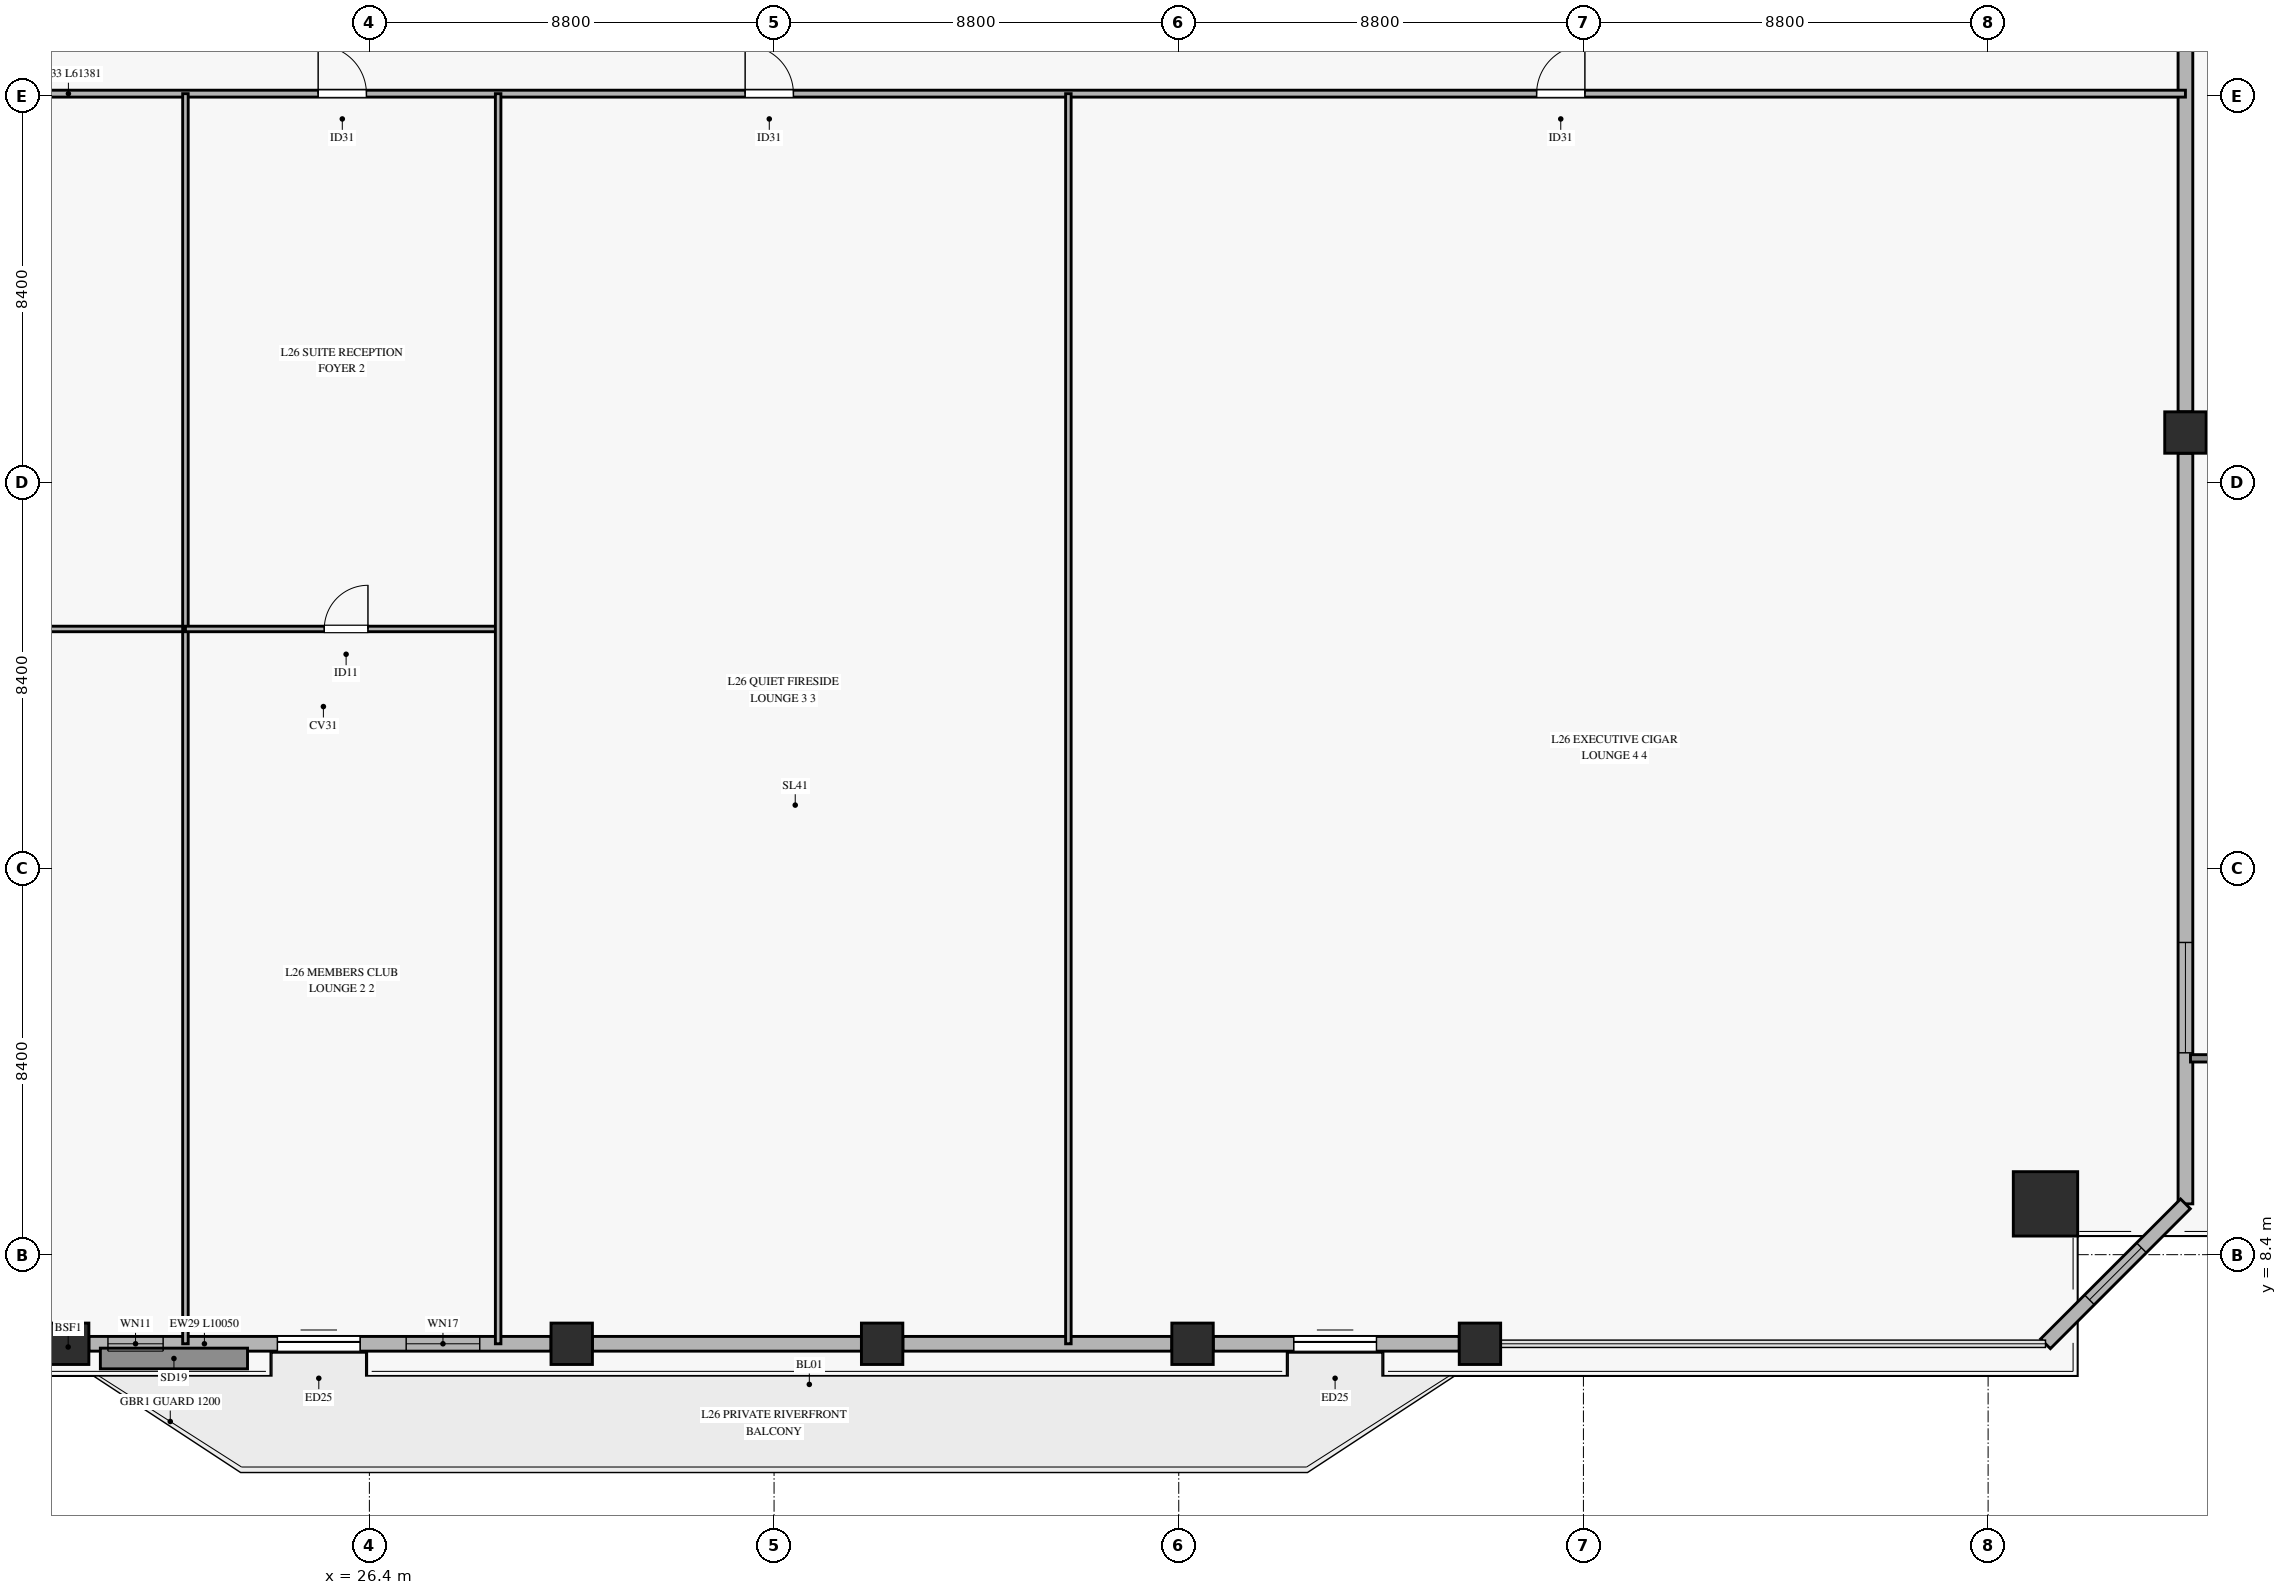
"""IFC4 building model, lengths in metres.
Left out: names, types, materials, properties, quantities, classifications, styles, units other than length and angle.
Written with IfcOpenShell. Run it as: python <this file> out.ifc"""

import sys

from ifc_helpers import new_model, si_unit, direction, frame, frame_2d, origin, origin_2d, place, context, subcontext, project, spatial, rectangle, hollow_rectangle, extrude, source, transform, mapped, element, fill, save


model = new_model("IFC4")
c1 = context("Model", 3, precision=1e-05, world=origin(), true_north=direction((0.0, 1.0)))
c2 = subcontext(c1, "Body", "Model", "MODEL_VIEW")
j1 = project(units=[si_unit("LENGTHUNIT", "METRE"), si_unit("PLANEANGLEUNIT", "RADIAN")], contexts=[c1])
p1 = place(None, origin())
s1 = spatial("IfcSite", under=j1, at=p1, CompositionType="ELEMENT")
p2 = place(p1, origin())
s2 = spatial("IfcBuilding", under=s1, at=p2, CompositionType="ELEMENT")
p3 = place(p2, frame((0.0, 0.0, 107.5)))
s3 = spatial("IfcBuildingStorey", under=s2, at=p3, CompositionType="ELEMENT", Elevation=107.5)
m1 = source(origin(), c2, "Body", "SweptSolid", [
    extrude(hollow_rectangle(XDim=1.4, YDim=1.4, WallThickness=0.065, at=origin_2d()), origin(), (0.0, 0.0, 1.0), 3.72),
])
p4 = place(p3, frame((62.848, 9.505, 0.0), z_axis=(-0.056179867265, 0.135002321221, 0.989251330946), x_axis=(-0.923249458172, -0.3842010385, 0.0)))
e1 = element("IfcColumn", 1, at=p4, inside=s3, PredefinedType="COLUMN", context=c2, shape_type="MappedRepresentation", body=[
    mapped(m1, transform((0.0, 0.0, 0.0), x_axis=(1.0, 0.0, 0.0), y_axis=(0.0, 1.0, 0.0), z_axis=(0.0, 0.0, 1.0), scale=1.0)),
])
m2 = source(origin(), c2, "Body", "SweptSolid", [
    extrude(hollow_rectangle(XDim=0.9, YDim=0.9, WallThickness=0.04, at=origin_2d()), origin(), (0.0, 0.0, 1.0), 3.718),
])
for number, where, z_axis, x_axis in (
    (2, (19.85, 6.462, 0.0), (0.0, 0.142, 0.99), (-1.0, 0.0, 0.0)),
    (3, (30.8, 6.462, 0.0), (0.0, 0.142, 0.99), (-1.0, 0.0, 0.0)),
    (4, (37.55, 6.462, 0.0), (0.0, 0.142, 0.99), (-1.0, 0.0, 0.0)),
    (5, (44.3, 6.462, 0.0), (0.0, 0.142, 0.99), (-1.0, 0.0, 0.0)),
    (6, (50.55, 6.462, 0.0), (0.0, 0.142, 0.99), (-1.0, 0.0, 0.0)),
):
    element("IfcColumn", number, at=place(p3, frame(where, z_axis=z_axis, x_axis=x_axis)), inside=s3, PredefinedType="COLUMN", context=c2, shape_type="MappedRepresentation", body=[
        mapped(m2, transform((0.0, 0.0, 0.0), x_axis=(1.0, 0.0, 0.0), y_axis=(0.0, 1.0, 0.0), z_axis=(0.0, 0.0, 1.0), scale=1.0)),
    ])
m3 = source(origin(), c2, "Body", "SweptSolid", [
    extrude(hollow_rectangle(XDim=0.9, YDim=0.9, WallThickness=0.04, at=origin_2d()), origin(), (0.0, 0.0, 1.0), 3.697),
])
p5 = place(p3, frame((65.891, 26.28, 0.0), z_axis=(-0.063595199298, 0.071651911982, 0.995400248209), x_axis=(-0.747903514813, -0.663807451397, 0.0)))
e7 = element("IfcColumn", 7, at=p5, inside=s3, PredefinedType="COLUMN", context=c2, shape_type="MappedRepresentation", body=[
    mapped(m3, transform((0.0, 0.0, 0.0), x_axis=(1.0, 0.0, 0.0), y_axis=(0.0, 1.0, 0.0), z_axis=(0.0, 0.0, 1.0), scale=1.0)),
])
p6 = place(p3, frame((20.3, 6.462, 0.0), z_axis=(0.0, 0.0, 1.0), x_axis=(1.0, 0.0, 0.0)))
e8 = element("IfcWall", 8, at=p6, inside=s3, PredefinedType="SOLIDWALL", context=c2, shape_type="SweptSolid", body=[
    extrude(rectangle(XDim=10.05, YDim=0.32, at=frame_2d((5.025, 0.0))), origin(), (0.0, 0.0, 1.0), 3.16),
])
p7 = place(p6, frame((4.1, 0.0, 0.0)))
e9 = element("IfcOpeningElement", 9, at=p7, cuts=e8, PredefinedType="OPENING", context=c2, shape_type="SweptSolid", body=[
    extrude(rectangle(XDim=1.8, YDim=2.25, at=frame_2d((0.9, 1.125))), frame((0.0, 0.17, 0.0), z_axis=(0.0, -1.0, 0.0), x_axis=(1.0, 0.0, 0.0)), (0.0, 0.0, 1.0), 0.34),
])
p8 = place(p6, frame((0.415, 0.0, 0.45)))
e10 = element("IfcOpeningElement", 10, at=p8, cuts=e8, PredefinedType="OPENING", context=c2, shape_type="SweptSolid", body=[
    extrude(rectangle(XDim=1.2, YDim=2.0, at=frame_2d((0.6, 1.0))), frame((0.0, 0.17, 0.0), z_axis=(0.0, -1.0, 0.0), x_axis=(1.0, 0.0, 0.0)), (0.0, 0.0, 1.0), 0.34),
])
p9 = place(p6, frame((6.9, 0.0, 0.45)))
e11 = element("IfcOpeningElement", 11, at=p9, cuts=e8, PredefinedType="OPENING", context=c2, shape_type="SweptSolid", body=[
    extrude(rectangle(XDim=1.6, YDim=2.0, at=frame_2d((0.8, 1.0))), frame((0.0, 0.17, 0.0), z_axis=(0.0, -1.0, 0.0), x_axis=(1.0, 0.0, 0.0)), (0.0, 0.0, 1.0), 0.34),
])
for number, where, z_axis, x_axis in (
    (12, (31.25, 6.462, 0.0), (0.0, 0.0, 1.0), (1.0, 0.0, 0.0)),
    (13, (38.0, 6.462, 0.0), (0.0, 0.0, 1.0), (1.0, 0.0, 0.0)),
):
    element("IfcWall", number, at=place(p3, frame(where, z_axis=z_axis, x_axis=x_axis)), inside=s3, PredefinedType="SOLIDWALL", context=c2, shape_type="SweptSolid", body=[
        extrude(rectangle(XDim=5.85, YDim=0.32, at=frame_2d((2.925, 0.0))), origin(), (0.0, 0.0, 1.0), 3.16),
    ])
p10 = place(p3, frame((44.75, 6.462, 0.0), z_axis=(0.0, 0.0, 1.0), x_axis=(1.0, 0.0, 0.0)))
e14 = element("IfcWall", 14, at=p10, inside=s3, PredefinedType="SOLIDWALL", context=c2, shape_type="SweptSolid", body=[
    extrude(rectangle(XDim=5.35, YDim=0.32, at=frame_2d((2.675, 0.0))), origin(), (0.0, 0.0, 1.0), 3.16),
])
p11 = place(p10, frame((1.75, 0.0, 0.0)))
e15 = element("IfcOpeningElement", 15, at=p11, cuts=e14, PredefinedType="OPENING", context=c2, shape_type="SweptSolid", body=[
    extrude(rectangle(XDim=1.8, YDim=2.25, at=frame_2d((0.9, 1.125))), frame((0.0, 0.17, 0.0), z_axis=(0.0, -1.0, 0.0), x_axis=(1.0, 0.0, 0.0)), (0.0, 0.0, 1.0), 0.34),
])
p12 = place(p3, frame((65.891, 9.505, 0.0), z_axis=(0.0, 0.0, 1.0), x_axis=(0.0, 1.0, 0.0)))
e16 = element("IfcWall", 16, at=p12, inside=s3, PredefinedType="SOLIDWALL", context=c2, shape_type="SweptSolid", body=[
    extrude(rectangle(XDim=16.325, YDim=0.32, at=frame_2d((8.163, 0.0))), origin(), (0.0, 0.0, 1.0), 3.16),
])
p13 = place(p12, frame((3.285, 0.0, 0.45)))
e17 = element("IfcOpeningElement", 17, at=p13, cuts=e16, PredefinedType="OPENING", context=c2, shape_type="SweptSolid", body=[
    extrude(rectangle(XDim=2.4, YDim=2.1, at=frame_2d((1.2, 1.05))), frame((0.0, 0.17, 0.0), z_axis=(0.0, -1.0, 0.0), x_axis=(1.0, 0.0, 0.0)), (0.0, 0.0, 1.0), 0.34),
])
p14 = place(p3, frame((65.891, 26.73, 0.0), z_axis=(0.0, 0.0, 1.0), x_axis=(0.0, 1.0, 0.0)))
e18 = element("IfcWall", 18, at=p14, inside=s3, PredefinedType="SOLIDWALL", context=c2, shape_type="SweptSolid", body=[
    extrude(rectangle(XDim=16.326, YDim=0.32, at=frame_2d((8.163, 0.0))), origin(), (0.0, 0.0, 1.0), 3.16),
])
p15 = place(p14, frame((11.125, 0.0, 0.45)))
e19 = element("IfcOpeningElement", 19, at=p15, cuts=e18, PredefinedType="OPENING", context=c2, shape_type="SweptSolid", body=[
    extrude(rectangle(XDim=2.4, YDim=2.1, at=frame_2d((1.2, 1.05))), frame((0.0, 0.17, 0.0), z_axis=(0.0, -1.0, 0.0), x_axis=(1.0, 0.0, 0.0)), (0.0, 0.0, 1.0), 0.34),
])
p16 = place(p3, frame((62.848, 6.462, 0.0), z_axis=(0.0, 0.0, 1.0), x_axis=(0.707135145445, 0.70707841579, 0.0)))
e20 = element("IfcWall", 20, at=p16, inside=s3, PredefinedType="SOLIDWALL", context=c2, shape_type="SweptSolid", body=[
    extrude(rectangle(XDim=4.303, YDim=0.3, at=frame_2d((2.152, 0.0))), origin(), (0.0, 0.0, 1.0), 3.16),
])
p17 = place(p16, frame((1.352, 0.0, 0.45)))
e21 = element("IfcOpeningElement", 21, at=p17, cuts=e20, PredefinedType="OPENING", context=c2, shape_type="SweptSolid", body=[
    extrude(rectangle(XDim=1.6, YDim=2.0, at=frame_2d((0.8, 1.0))), frame((0.0, 0.16, 0.0), z_axis=(0.0, -1.0, 0.0), x_axis=(1.0, 0.0, 0.0)), (0.0, 0.0, 1.0), 0.32),
])
p18 = place(p3, frame((4.51, 33.65, 0.0), z_axis=(0.0, 0.0, 1.0), x_axis=(1.0, 0.0, 0.0)))
e22 = element("IfcWall", 22, at=p18, inside=s3, PredefinedType="PARTITIONING", context=c2, shape_type="SweptSolid", body=[
    extrude(rectangle(XDim=61.381, YDim=0.15, at=frame_2d((30.69, 0.0))), origin(), (0.0, 0.0, 1.0), 2.765),
])
p19 = place(p18, frame((7.582, 0.0, 0.0)))
e23 = element("IfcOpeningElement", 23, at=p19, cuts=e22, PredefinedType="OPENING", context=c2, shape_type="SweptSolid", body=[
    extrude(rectangle(XDim=1.05, YDim=2.15, at=frame_2d((0.525, 1.075))), frame((0.0, 0.085, 0.0), z_axis=(0.0, -1.0, 0.0), x_axis=(1.0, 0.0, 0.0)), (0.0, 0.0, 1.0), 0.17),
])
p20 = place(p18, frame((20.776, 0.0, 0.0)))
e24 = element("IfcOpeningElement", 24, at=p20, cuts=e22, PredefinedType="OPENING", context=c2, shape_type="SweptSolid", body=[
    extrude(rectangle(XDim=1.05, YDim=2.15, at=frame_2d((0.525, 1.075))), frame((0.0, 0.085, 0.0), z_axis=(0.0, -1.0, 0.0), x_axis=(1.0, 0.0, 0.0)), (0.0, 0.0, 1.0), 0.17),
])
p21 = place(p18, frame((30.061, 0.0, 0.0)))
e25 = element("IfcOpeningElement", 25, at=p21, cuts=e22, PredefinedType="OPENING", context=c2, shape_type="SweptSolid", body=[
    extrude(rectangle(XDim=1.05, YDim=2.15, at=frame_2d((0.525, 1.075))), frame((0.0, 0.085, 0.0), z_axis=(0.0, -1.0, 0.0), x_axis=(1.0, 0.0, 0.0)), (0.0, 0.0, 1.0), 0.17),
])
p22 = place(p18, frame((47.272, 0.0, 0.0)))
e26 = element("IfcOpeningElement", 26, at=p22, cuts=e22, PredefinedType="OPENING", context=c2, shape_type="SweptSolid", body=[
    extrude(rectangle(XDim=1.05, YDim=2.15, at=frame_2d((0.525, 1.075))), frame((0.0, 0.085, 0.0), z_axis=(0.0, -1.0, 0.0), x_axis=(1.0, 0.0, 0.0)), (0.0, 0.0, 1.0), 0.17),
])
p23 = place(p3, frame((4.51, 22.008, 0.0), z_axis=(0.0, 0.0, 1.0), x_axis=(1.0, 0.0, 0.0)))
e27 = element("IfcWall", 27, at=p23, inside=s3, PredefinedType="PARTITIONING", context=c2, shape_type="SweptSolid", body=[
    extrude(rectangle(XDim=17.89, YDim=0.12, at=frame_2d((8.945, 0.0))), origin(), (0.0, 0.0, 1.0), 2.765),
])
p24 = place(p23, frame((7.928, 0.0, 0.0)))
e28 = element("IfcOpeningElement", 28, at=p24, cuts=e27, PredefinedType="OPENING", context=c2, shape_type="SweptSolid", body=[
    extrude(rectangle(XDim=0.95, YDim=2.1, at=frame_2d((0.475, 1.05))), frame((0.0, 0.07, 0.0), z_axis=(0.0, -1.0, 0.0), x_axis=(1.0, 0.0, 0.0)), (0.0, 0.0, 1.0), 0.14),
])
p25 = place(p3, frame((22.4, 6.462, 0.0), z_axis=(0.0, 0.0, 1.0), x_axis=(0.0, 1.0, 0.0)))
e29 = element("IfcWall", 29, at=p25, inside=s3, PredefinedType="PARTITIONING", context=c2, shape_type="SweptSolid", body=[
    extrude(rectangle(XDim=27.188, YDim=0.12, at=frame_2d((13.594, 0.0))), origin(), (0.0, 0.0, 1.0), 3.165),
])
p26 = place(p3, frame((22.4, 22.008, 0.0), z_axis=(0.0, 0.0, 1.0), x_axis=(1.0, 0.0, 0.0)))
e30 = element("IfcWall", 30, at=p26, inside=s3, PredefinedType="PARTITIONING", context=c2, shape_type="SweptSolid", body=[
    extrude(rectangle(XDim=6.8, YDim=0.12, at=frame_2d((3.4, 0.0))), origin(), (0.0, 0.0, 1.0), 3.68),
])
p27 = place(p26, frame((3.019, 0.0, 0.0)))
e31 = element("IfcOpeningElement", 31, at=p27, cuts=e30, PredefinedType="OPENING", context=c2, shape_type="SweptSolid", body=[
    extrude(rectangle(XDim=0.95, YDim=2.1, at=frame_2d((0.475, 1.05))), frame((0.0, 0.07, 0.0), z_axis=(0.0, -1.0, 0.0), x_axis=(1.0, 0.0, 0.0)), (0.0, 0.0, 1.0), 0.14),
])
for number, where, z_axis, x_axis in (
    (32, (29.2, 6.462, 0.0), (0.0, 0.0, 1.0), (0.0, 1.0, 0.0)),
    (33, (41.6, 6.462, 0.0), (0.0, 0.0, 1.0), (0.0, 1.0, 0.0)),
):
    element("IfcWall", number, at=place(p3, frame(where, z_axis=z_axis, x_axis=x_axis)), inside=s3, PredefinedType="PARTITIONING", context=c2, shape_type="SweptSolid", body=[
        extrude(rectangle(XDim=27.188, YDim=0.12, at=frame_2d((13.594, 0.0))), origin(), (0.0, 0.0, 1.0), 3.165),
    ])
m4 = source(origin(), c2, "Body", "SweptSolid", [
    extrude(rectangle(XDim=1.8, YDim=2.25, at=frame_2d((0.9, 1.125))), frame((0.0, 0.025, 0.0), z_axis=(0.0, -1.0, 0.0), x_axis=(1.0, 0.0, 0.0)), (0.0, 0.0, 1.0), 0.05),
])
p28 = place(p7, origin())
e34 = element("IfcDoor", 34, at=p28, inside=s3, OperationType="SLIDING_TO_LEFT", PredefinedType="DOOR", context=c2, shape_type="MappedRepresentation", body=[
    mapped(m4, transform((0.0, 0.0, 0.0), x_axis=(1.0, 0.0, 0.0), y_axis=(0.0, 1.0, 0.0), z_axis=(0.0, 0.0, 1.0), scale=1.0)),
])
fill(e9, e34)
m5 = source(origin(), c2, "Body", "SweptSolid", [
    extrude(rectangle(XDim=1.2, YDim=2.0, at=frame_2d((0.6, 1.0))), frame((0.0, 0.03, 0.0), z_axis=(0.0, -1.0, 0.0), x_axis=(1.0, 0.0, 0.0)), (0.0, 0.0, 1.0), 0.06),
])
p29 = place(p8, origin())
e35 = element("IfcWindow", 35, at=p29, inside=s3, PartitioningType="SINGLE_PANEL", PredefinedType="WINDOW", context=c2, shape_type="MappedRepresentation", body=[
    mapped(m5, transform((0.0, 0.0, 0.0), x_axis=(1.0, 0.0, 0.0), y_axis=(0.0, 1.0, 0.0), z_axis=(0.0, 0.0, 1.0), scale=1.0)),
])
fill(e10, e35)
m6 = source(origin(), c2, "Body", "SweptSolid", [
    extrude(rectangle(XDim=1.6, YDim=2.0, at=frame_2d((0.8, 1.0))), frame((0.0, 0.03, 0.0), z_axis=(0.0, -1.0, 0.0), x_axis=(1.0, 0.0, 0.0)), (0.0, 0.0, 1.0), 0.06),
])
p30 = place(p9, origin())
e36 = element("IfcWindow", 36, at=p30, inside=s3, PartitioningType="SINGLE_PANEL", PredefinedType="WINDOW", context=c2, shape_type="MappedRepresentation", body=[
    mapped(m6, transform((0.0, 0.0, 0.0), x_axis=(1.0, 0.0, 0.0), y_axis=(0.0, 1.0, 0.0), z_axis=(0.0, 0.0, 1.0), scale=1.0)),
])
fill(e11, e36)
p31 = place(p11, origin())
e37 = element("IfcDoor", 37, at=p31, inside=s3, OperationType="SLIDING_TO_LEFT", PredefinedType="DOOR", context=c2, shape_type="MappedRepresentation", body=[
    mapped(m4, transform((0.0, 0.0, 0.0), x_axis=(1.0, 0.0, 0.0), y_axis=(0.0, 1.0, 0.0), z_axis=(0.0, 0.0, 1.0), scale=1.0)),
])
fill(e15, e37)
m7 = source(origin(), c2, "Body", "SweptSolid", [
    extrude(rectangle(XDim=2.4, YDim=2.1, at=frame_2d((1.2, 1.05))), frame((0.0, 0.03, 0.0), z_axis=(0.0, -1.0, 0.0), x_axis=(1.0, 0.0, 0.0)), (0.0, 0.0, 1.0), 0.06),
])
p32 = place(p13, origin())
e38 = element("IfcWindow", 38, at=p32, inside=s3, PartitioningType="SINGLE_PANEL", PredefinedType="WINDOW", context=c2, shape_type="MappedRepresentation", body=[
    mapped(m7, transform((0.0, 0.0, 0.0), x_axis=(1.0, 0.0, 0.0), y_axis=(0.0, 1.0, 0.0), z_axis=(0.0, 0.0, 1.0), scale=1.0)),
])
fill(e17, e38)
p33 = place(p17, origin())
e39 = element("IfcWindow", 39, at=p33, inside=s3, PartitioningType="SINGLE_PANEL", PredefinedType="WINDOW", context=c2, shape_type="MappedRepresentation", body=[
    mapped(m6, transform((0.0, 0.0, 0.0), x_axis=(1.0, 0.0, 0.0), y_axis=(0.0, 1.0, 0.0), z_axis=(0.0, 0.0, 1.0), scale=1.0)),
])
fill(e21, e39)
m8 = source(origin(), c2, "Body", "SweptSolid", [
    extrude(rectangle(XDim=1.05, YDim=2.15, at=frame_2d((0.525, 1.075))), frame((0.0, 0.025, 0.0), z_axis=(0.0, -1.0, 0.0), x_axis=(1.0, 0.0, 0.0)), (0.0, 0.0, 1.0), 0.05),
])
p34 = place(p20, origin())
e40 = element("IfcDoor", 40, at=p34, inside=s3, OperationType="SINGLE_SWING_LEFT", PredefinedType="DOOR", context=c2, shape_type="MappedRepresentation", body=[
    mapped(m8, transform((0.0, 0.0, 0.0), x_axis=(1.0, 0.0, 0.0), y_axis=(0.0, 1.0, 0.0), z_axis=(0.0, 0.0, 1.0), scale=1.0)),
])
fill(e24, e40)
m9 = source(origin(), c2, "Body", "SweptSolid", [
    extrude(rectangle(XDim=0.95, YDim=2.1, at=frame_2d((0.475, 1.05))), frame((0.0, 0.025, 0.0), z_axis=(0.0, -1.0, 0.0), x_axis=(1.0, 0.0, 0.0)), (0.0, 0.0, 1.0), 0.05),
])
p35 = place(p27, origin())
e41 = element("IfcDoor", 41, at=p35, inside=s3, OperationType="SINGLE_SWING_RIGHT", PredefinedType="DOOR", context=c2, shape_type="MappedRepresentation", body=[
    mapped(m9, transform((0.0, 0.0, 0.0), x_axis=(1.0, 0.0, 0.0), y_axis=(0.0, 1.0, 0.0), z_axis=(0.0, 0.0, 1.0), scale=1.0)),
])
fill(e31, e41)
p36 = place(p21, origin())
e42 = element("IfcDoor", 42, at=p36, inside=s3, OperationType="SINGLE_SWING_LEFT", PredefinedType="DOOR", context=c2, shape_type="MappedRepresentation", body=[
    mapped(m8, transform((0.0, 0.0, 0.0), x_axis=(1.0, 0.0, 0.0), y_axis=(0.0, 1.0, 0.0), z_axis=(0.0, 0.0, 1.0), scale=1.0)),
])
fill(e25, e42)
p37 = place(p22, origin())
e43 = element("IfcDoor", 43, at=p37, inside=s3, OperationType="SINGLE_SWING_RIGHT", PredefinedType="DOOR", context=c2, shape_type="MappedRepresentation", body=[
    mapped(m8, transform((0.0, 0.0, 0.0), x_axis=(1.0, 0.0, 0.0), y_axis=(0.0, 1.0, 0.0), z_axis=(0.0, 0.0, 1.0), scale=1.0)),
])
fill(e26, e43)
save(model, sys.argv[1])
